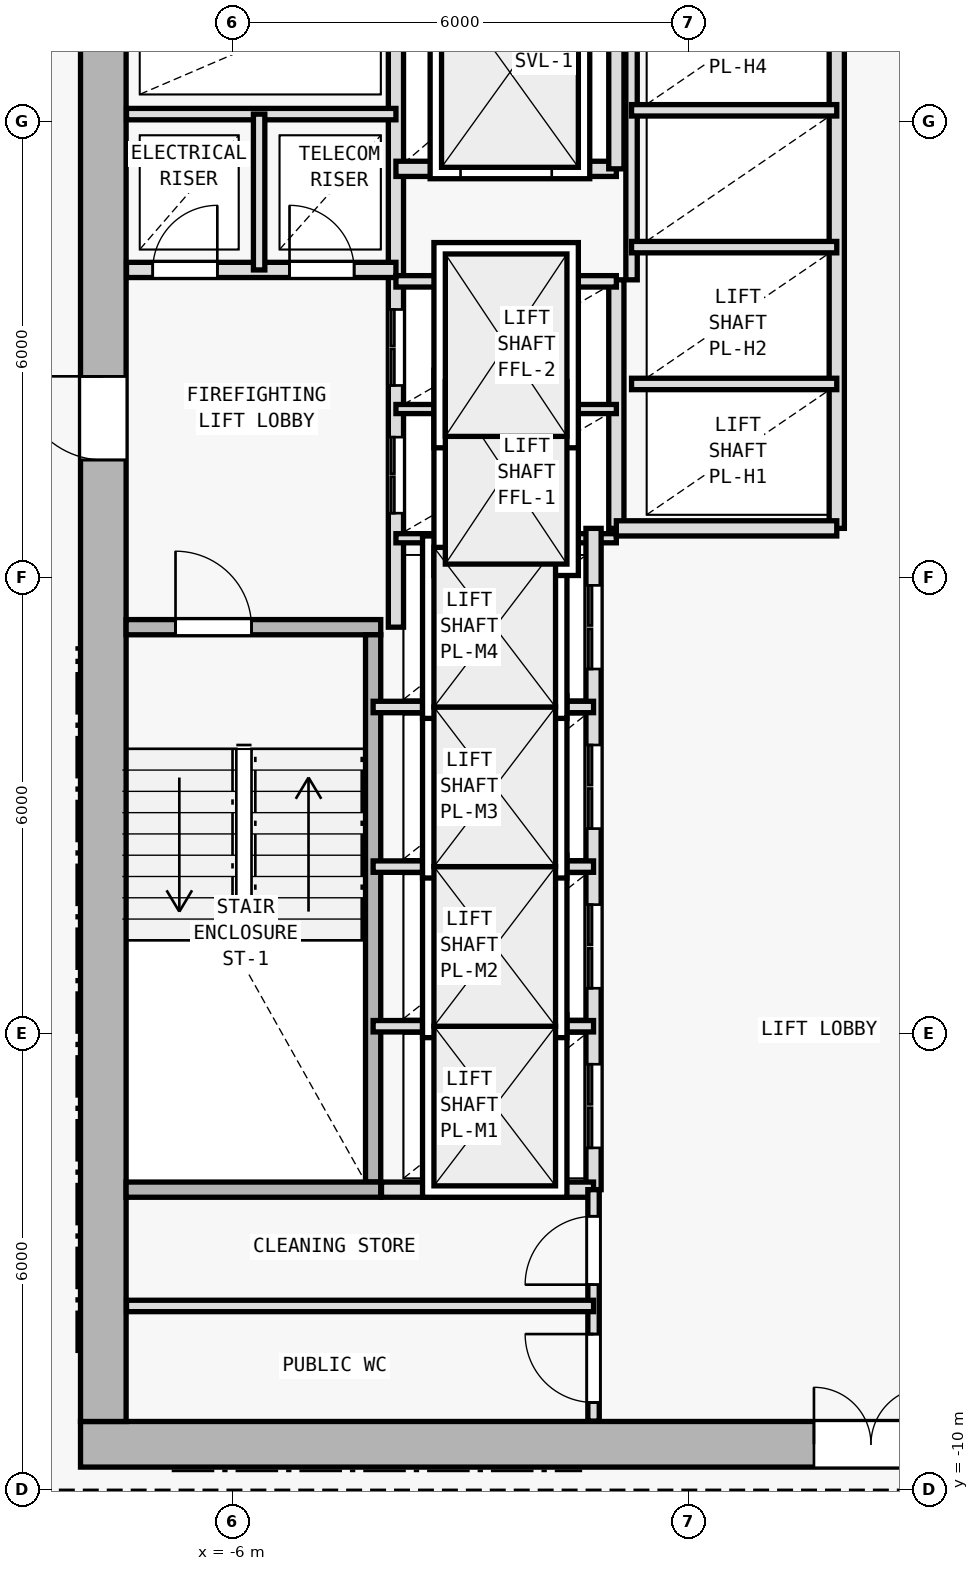
"""IFC4 building model, lengths in metres.
Left out: names, types, materials, properties, quantities, classifications, styles, units other than length and angle.
Written with IfcOpenShell. Run it as: python <this file> out.ifc"""

import sys

from ifc_helpers import new_model, si_unit, direction, frame, frame_2d, origin, origin_2d, place, context, subcontext, project, spatial, rectangle, i_section, extrude, element, fill, save


model = new_model("IFC4")
c1 = context("Model", 3, precision=1e-05, world=origin(), true_north=direction((0.0, 1.0)))
c2 = subcontext(c1, "Body", "Model", "MODEL_VIEW")
j1 = project(units=[si_unit("LENGTHUNIT", "METRE"), si_unit("PLANEANGLEUNIT", "RADIAN")], contexts=[c1])
p1 = place(None, origin())
s1 = spatial("IfcSite", under=j1, at=p1, CompositionType="ELEMENT")
p2 = place(p1, origin())
s2 = spatial("IfcBuilding", under=s1, at=p2, CompositionType="ELEMENT")
p3 = place(p2, frame((0.0, 0.0, 114.9)))
s3 = spatial("IfcBuildingStorey", under=s2, at=p3, CompositionType="ELEMENT", Elevation=114.9)
for number, where, z_axis, x_axis in (
    (1, (-7.7, -9.4, 0.0), (0.0, 0.0, 1.0), (1.0, 0.0, 0.0)),
    (2, (0.0, -9.4, 0.0), (0.0, 0.0, 1.0), (1.0, 0.0, 0.0)),
    (3, (-7.7, 2.0, 0.0), (0.0, 0.0, 1.0), (1.0, 0.0, 0.0)),
):
    element("IfcColumn", number, at=place(p3, frame(where, z_axis=z_axis, x_axis=x_axis)), inside=s3, PredefinedType="COLUMN", context=c2, shape_type="SweptSolid", body=[
        extrude(i_section(OverallWidth=0.409, OverallDepth=0.425, WebThickness=0.021, FlangeThickness=0.034, FilletRadius=0.015, at=origin_2d()), origin(), (0.0, 0.0, 1.0), 3.6),
    ])
p4 = place(p3, frame((-8.0, -9.4, 0.0), z_axis=(0.0, 0.0, 1.0), x_axis=(1.0, 0.0, 0.0)))
e4 = element("IfcWall", 4, at=p4, inside=s3, PredefinedType="SHEAR", context=c2, shape_type="SweptSolid", body=[
    extrude(rectangle(XDim=16.0, YDim=0.6, at=frame_2d((8.0, 0.0))), origin(), (0.0, 0.0, 1.0), 3.35),
])
p5 = place(p4, frame((9.65, 0.0, 0.0)))
e5 = element("IfcOpeningElement", 5, at=p5, cuts=e4, PredefinedType="OPENING", context=c2, shape_type="SweptSolid", body=[
    extrude(rectangle(XDim=1.5, YDim=2.2, at=frame_2d((0.75, 1.1))), frame((0.0, 0.31, 0.0), z_axis=(0.0, -1.0, 0.0), x_axis=(1.0, 0.0, 0.0)), (0.0, 0.0, 1.0), 0.62),
])
p6 = place(p3, frame((-7.7, -9.1, 0.0), z_axis=(0.0, 0.0, 1.0), x_axis=(0.0, 1.0, 0.0)))
e6 = element("IfcWall", 6, at=p6, inside=s3, PredefinedType="SHEAR", context=c2, shape_type="SweptSolid", body=[
    extrude(rectangle(XDim=19.0, YDim=0.6, at=frame_2d((9.5, 0.0))), origin(), (0.0, 0.0, 1.0), 3.35),
])
p7 = place(p6, frame((12.65, 0.0, 0.0)))
e7 = element("IfcOpeningElement", 7, at=p7, cuts=e6, PredefinedType="OPENING", context=c2, shape_type="SweptSolid", body=[
    extrude(rectangle(XDim=1.1, YDim=2.15, at=frame_2d((0.55, 1.075))), frame((0.0, 0.31, 0.0), z_axis=(0.0, -1.0, 0.0), x_axis=(1.0, 0.0, 0.0)), (0.0, 0.0, 1.0), 0.62),
])
p8 = place(p3, frame((-7.4, 1.35, 0.0), z_axis=(0.0, 0.0, 1.0), x_axis=(1.0, 0.0, 0.0)))
e8 = element("IfcWall", 8, at=p8, inside=s3, PredefinedType="SOLIDWALL", context=c2, shape_type="SweptSolid", body=[
    extrude(rectangle(XDim=3.35, YDim=0.2, at=frame_2d((1.675, 0.0))), origin(), (0.0, 0.0, 1.0), 3.35),
])
p9 = place(p8, frame((0.65, 0.0, 0.0)))
e9 = element("IfcOpeningElement", 9, at=p9, cuts=e8, PredefinedType="OPENING", context=c2, shape_type="SweptSolid", body=[
    extrude(rectangle(XDim=1.0, YDim=2.15, at=frame_2d((0.5, 1.075))), frame((0.0, 0.11, 0.0), z_axis=(0.0, -1.0, 0.0), x_axis=(1.0, 0.0, 0.0)), (0.0, 0.0, 1.0), 0.22),
])
p10 = place(p3, frame((-4.15, -5.95, 0.0), z_axis=(0.0, 0.0, 1.0), x_axis=(0.0, 1.0, 0.0)))
e10 = element("IfcWall", 10, at=p10, inside=s3, PredefinedType="SOLIDWALL", context=c2, shape_type="SweptSolid", body=[
    extrude(rectangle(XDim=7.2, YDim=0.2, at=frame_2d((3.6, 0.0))), origin(), (0.0, 0.0, 1.0), 3.35),
])
p11 = place(p3, frame((-3.85, 1.35, 0.0), z_axis=(0.0, 0.0, 1.0), x_axis=(0.0, 1.0, 0.0)))
e11 = element("IfcWall", 11, at=p11, inside=s3, PredefinedType="SOLIDWALL", context=c2, shape_type="SweptSolid", body=[
    extrude(rectangle(XDim=8.545, YDim=0.2, at=frame_2d((4.272, 0.0))), origin(), (0.0, 0.0, 1.0), 3.35),
])
p12 = place(p11, frame((1.5, 0.0, 0.0)))
e12 = element("IfcOpeningElement", 12, at=p12, cuts=e11, PredefinedType="OPENING", context=c2, shape_type="SweptSolid", body=[
    extrude(rectangle(XDim=1.0, YDim=2.15, at=frame_2d((0.5, 1.075))), frame((0.0, 0.11, 0.0), z_axis=(0.0, -1.0, 0.0), x_axis=(1.0, 0.0, 0.0)), (0.0, 0.0, 1.0), 0.22),
])
p13 = place(p11, frame((3.18, 0.0, 0.0)))
e13 = element("IfcOpeningElement", 13, at=p13, cuts=e11, PredefinedType="OPENING", context=c2, shape_type="SweptSolid", body=[
    extrude(rectangle(XDim=1.0, YDim=2.15, at=frame_2d((0.5, 1.075))), frame((0.0, 0.11, 0.0), z_axis=(0.0, -1.0, 0.0), x_axis=(1.0, 0.0, 0.0)), (0.0, 0.0, 1.0), 0.22),
])
p14 = place(p3, frame((-7.395, 6.05, 0.0), z_axis=(0.0, 0.0, 1.0), x_axis=(1.0, 0.0, 0.0)))
e14 = element("IfcWall", 14, at=p14, inside=s3, PredefinedType="SOLIDWALL", context=c2, shape_type="SweptSolid", body=[
    extrude(rectangle(XDim=3.545, YDim=0.2, at=frame_2d((1.772, 0.0))), origin(), (0.0, 0.0, 1.0), 3.35),
])
p15 = place(p14, frame((0.345, 0.0, 0.0)))
e15 = element("IfcOpeningElement", 15, at=p15, cuts=e14, PredefinedType="OPENING", context=c2, shape_type="SweptSolid", body=[
    extrude(rectangle(XDim=0.85, YDim=2.1, at=frame_2d((0.425, 1.05))), frame((0.0, 0.11, 0.0), z_axis=(0.0, -1.0, 0.0), x_axis=(1.0, 0.0, 0.0)), (0.0, 0.0, 1.0), 0.22),
])
p16 = place(p14, frame((2.145, 0.0, 0.0)))
e16 = element("IfcOpeningElement", 16, at=p16, cuts=e14, PredefinedType="OPENING", context=c2, shape_type="SweptSolid", body=[
    extrude(rectangle(XDim=0.85, YDim=2.1, at=frame_2d((0.425, 1.05))), frame((0.0, 0.11, 0.0), z_axis=(0.0, -1.0, 0.0), x_axis=(1.0, 0.0, 0.0)), (0.0, 0.0, 1.0), 0.22),
])
p17 = place(p3, frame((-7.395, 8.1, 0.0), z_axis=(0.0, 0.0, 1.0), x_axis=(1.0, 0.0, 0.0)))
e17 = element("IfcWall", 17, at=p17, inside=s3, PredefinedType="PARTITIONING", context=c2, shape_type="SweptSolid", body=[
    extrude(rectangle(XDim=3.545, YDim=0.15, at=frame_2d((1.772, 0.0))), origin(), (0.0, 0.0, 1.0), 3.35),
])
p18 = place(p3, frame((-5.65, 6.05, 0.0), z_axis=(0.0, 0.0, 1.0), x_axis=(0.0, 1.0, 0.0)))
e18 = element("IfcWall", 18, at=p18, inside=s3, PredefinedType="PARTITIONING", context=c2, shape_type="SweptSolid", body=[
    extrude(rectangle(XDim=2.05, YDim=0.15, at=frame_2d((1.025, 0.0))), origin(), (0.0, 0.0, 1.0), 3.35),
])
p19 = place(p3, frame((-0.95, 2.65, 0.0), z_axis=(0.0, 0.0, 1.0), x_axis=(0.0, 1.0, 0.0)))
e19 = element("IfcWall", 19, at=p19, inside=s3, PredefinedType="SOLIDWALL", context=c2, shape_type="SweptSolid", body=[
    extrude(rectangle(XDim=3.27, YDim=0.2, at=frame_2d((1.635, 0.0))), origin(), (0.0, 0.0, 1.0), 3.35),
])
for number, where, z_axis, x_axis in (
    (20, (-3.85, 2.52, 0.0), (0.0, 0.0, 1.0), (1.0, 0.0, 0.0)),
    (21, (-3.85, 4.22, 0.0), (0.0, 0.0, 1.0), (1.0, 0.0, 0.0)),
):
    element("IfcWall", number, at=place(p3, frame(where, z_axis=z_axis, x_axis=x_axis)), inside=s3, PredefinedType="PARTITIONING", context=c2, shape_type="SweptSolid", body=[
        extrude(rectangle(XDim=2.9, YDim=0.12, at=frame_2d((1.45, 0.0))), origin(), (0.0, 0.0, 1.0), 3.35),
    ])
p20 = place(p3, frame((-3.85, 5.9, 0.0), z_axis=(0.0, 0.0, 1.0), x_axis=(1.0, 0.0, 0.0)))
e22 = element("IfcWall", 22, at=p20, inside=s3, PredefinedType="PARTITIONING", context=c2, shape_type="SweptSolid", body=[
    extrude(rectangle(XDim=2.9, YDim=0.15, at=frame_2d((1.45, 0.0))), origin(), (0.0, 0.0, 1.0), 3.35),
])
p21 = place(p3, frame((-3.85, 7.38, 0.0), z_axis=(0.0, 0.0, 1.0), x_axis=(1.0, 0.0, 0.0)))
e23 = element("IfcWall", 23, at=p21, inside=s3, PredefinedType="SOLIDWALL", context=c2, shape_type="SweptSolid", body=[
    extrude(rectangle(XDim=2.9, YDim=0.2, at=frame_2d((1.45, 0.0))), origin(), (0.0, 0.0, 1.0), 3.35),
])
p22 = place(p21, frame((0.85, 0.0, 0.0)))
e24 = element("IfcOpeningElement", 24, at=p22, cuts=e23, PredefinedType="OPENING", context=c2, shape_type="SweptSolid", body=[
    extrude(rectangle(XDim=1.2, YDim=2.2, at=frame_2d((0.6, 1.1))), frame((0.0, 0.11, 0.0), z_axis=(0.0, -1.0, 0.0), x_axis=(1.0, 0.0, 0.0)), (0.0, 0.0, 1.0), 0.22),
])
p23 = place(p3, frame((-0.95, 7.38, 0.0), z_axis=(0.0, 0.0, 1.0), x_axis=(0.0, 1.0, 0.0)))
e25 = element("IfcWall", 25, at=p23, inside=s3, PredefinedType="SOLIDWALL", context=c2, shape_type="SweptSolid", body=[
    extrude(rectangle(XDim=2.515, YDim=0.2, at=frame_2d((1.258, 0.0))), origin(), (0.0, 0.0, 1.0), 3.35),
])
p24 = place(p3, frame((-1.25, -6.05, 0.0), z_axis=(0.0, 0.0, 1.0), x_axis=(0.0, 1.0, 0.0)))
e26 = element("IfcWall", 26, at=p24, inside=s3, PredefinedType="SOLIDWALL", context=c2, shape_type="SweptSolid", body=[
    extrude(rectangle(XDim=8.7, YDim=0.2, at=frame_2d((4.35, 0.0))), origin(), (0.0, 0.0, 1.0), 3.35),
])
p25 = place(p24, frame((0.55, 0.0, 0.0)))
e27 = element("IfcOpeningElement", 27, at=p25, cuts=e26, PredefinedType="OPENING", context=c2, shape_type="SweptSolid", body=[
    extrude(rectangle(XDim=1.1, YDim=2.15, at=frame_2d((0.55, 1.075))), frame((0.0, 0.11, 0.0), z_axis=(0.0, -1.0, 0.0), x_axis=(1.0, 0.0, 0.0)), (0.0, 0.0, 1.0), 0.22),
])
p26 = place(p24, frame((2.65, 0.0, 0.0)))
e28 = element("IfcOpeningElement", 28, at=p26, cuts=e26, PredefinedType="OPENING", context=c2, shape_type="SweptSolid", body=[
    extrude(rectangle(XDim=1.1, YDim=2.15, at=frame_2d((0.55, 1.075))), frame((0.0, 0.11, 0.0), z_axis=(0.0, -1.0, 0.0), x_axis=(1.0, 0.0, 0.0)), (0.0, 0.0, 1.0), 0.22),
])
p27 = place(p24, frame((4.75, 0.0, 0.0)))
e29 = element("IfcOpeningElement", 29, at=p27, cuts=e26, PredefinedType="OPENING", context=c2, shape_type="SweptSolid", body=[
    extrude(rectangle(XDim=1.1, YDim=2.15, at=frame_2d((0.55, 1.075))), frame((0.0, 0.11, 0.0), z_axis=(0.0, -1.0, 0.0), x_axis=(1.0, 0.0, 0.0)), (0.0, 0.0, 1.0), 0.22),
])
p28 = place(p24, frame((6.85, 0.0, 0.0)))
e30 = element("IfcOpeningElement", 30, at=p28, cuts=e26, PredefinedType="OPENING", context=c2, shape_type="SweptSolid", body=[
    extrude(rectangle(XDim=1.1, YDim=2.15, at=frame_2d((0.55, 1.075))), frame((0.0, 0.11, 0.0), z_axis=(0.0, -1.0, 0.0), x_axis=(1.0, 0.0, 0.0)), (0.0, 0.0, 1.0), 0.22),
])
for number, where, z_axis, x_axis in (
    (31, (-4.15, -3.9, 0.0), (0.0, 0.0, 1.0), (1.0, 0.0, 0.0)),
    (32, (-4.15, -1.8, 0.0), (0.0, 0.0, 1.0), (1.0, 0.0, 0.0)),
    (33, (-4.15, 0.3, 0.0), (0.0, 0.0, 1.0), (1.0, 0.0, 0.0)),
):
    element("IfcWall", number, at=place(p3, frame(where, z_axis=z_axis, x_axis=x_axis)), inside=s3, PredefinedType="PARTITIONING", context=c2, shape_type="SweptSolid", body=[
        extrude(rectangle(XDim=2.9, YDim=0.15, at=frame_2d((1.45, 0.0))), origin(), (0.0, 0.0, 1.0), 3.35),
    ])
p29 = place(p3, frame((1.95, 2.65, 0.0), z_axis=(0.0, 0.0, 1.0), x_axis=(0.0, 1.0, 0.0)))
e34 = element("IfcWall", 34, at=p29, inside=s3, PredefinedType="SOLIDWALL", context=c2, shape_type="SweptSolid", body=[
    extrude(rectangle(XDim=7.245, YDim=0.2, at=frame_2d((3.623, 0.0))), origin(), (0.0, 0.0, 1.0), 3.35),
])
p30 = place(p3, frame((-0.95, 2.65, 0.0), z_axis=(0.0, 0.0, 1.0), x_axis=(1.0, 0.0, 0.0)))
e35 = element("IfcWall", 35, at=p30, inside=s3, PredefinedType="SOLIDWALL", context=c2, shape_type="SweptSolid", body=[
    extrude(rectangle(XDim=2.9, YDim=0.2, at=frame_2d((1.45, 0.0))), origin(), (0.0, 0.0, 1.0), 3.35),
])
p31 = place(p3, frame((-0.75, 5.92, 0.0), z_axis=(0.0, 0.0, 1.0), x_axis=(0.0, 1.0, 0.0)))
e36 = element("IfcWall", 36, at=p31, inside=s3, PredefinedType="PARTITIONING", context=c2, shape_type="SweptSolid", body=[
    extrude(rectangle(XDim=3.975, YDim=0.15, at=frame_2d((1.988, 0.0))), origin(), (0.0, 0.0, 1.0), 3.35),
])
for number, where, z_axis, x_axis in (
    (37, (-0.75, 4.55, 0.0), (0.0, 0.0, 1.0), (1.0, 0.0, 0.0)),
    (38, (-0.75, 6.35, 0.0), (0.0, 0.0, 1.0), (1.0, 0.0, 0.0)),
    (39, (-0.75, 8.15, 0.0), (0.0, 0.0, 1.0), (1.0, 0.0, 0.0)),
):
    element("IfcWall", number, at=place(p3, frame(where, z_axis=z_axis, x_axis=x_axis)), inside=s3, PredefinedType="PARTITIONING", context=c2, shape_type="SweptSolid", body=[
        extrude(rectangle(XDim=2.7, YDim=0.15, at=frame_2d((1.35, 0.0))), origin(), (0.0, 0.0, 1.0), 3.35),
    ])
p32 = place(p3, frame((-7.4, -6.05, 0.0), z_axis=(0.0, 0.0, 1.0), x_axis=(1.0, 0.0, 0.0)))
e40 = element("IfcWall", 40, at=p32, inside=s3, PredefinedType="SOLIDWALL", context=c2, shape_type="SweptSolid", body=[
    extrude(rectangle(XDim=3.35, YDim=0.2, at=frame_2d((1.675, 0.0))), origin(), (0.0, 0.0, 1.0), 3.35),
])
p33 = place(p3, frame((-4.04, -6.05, 0.0), z_axis=(0.0, 0.0, 1.0), x_axis=(1.0, 0.0, 0.0)))
e41 = element("IfcWall", 41, at=p33, inside=s3, PredefinedType="SOLIDWALL", context=c2, shape_type="SweptSolid", body=[
    extrude(rectangle(XDim=2.79, YDim=0.2, at=frame_2d((1.395, 0.0))), origin(), (0.0, 0.0, 1.0), 3.35),
])
p34 = place(p3, frame((-1.25, -9.095, 0.0), z_axis=(0.0, 0.0, 1.0), x_axis=(0.0, 1.0, 0.0)))
e42 = element("IfcWall", 42, at=p34, inside=s3, PredefinedType="PARTITIONING", context=c2, shape_type="SweptSolid", body=[
    extrude(rectangle(XDim=3.045, YDim=0.15, at=frame_2d((1.522, 0.0))), origin(), (0.0, 0.0, 1.0), 3.35),
])
p35 = place(p34, frame((1.795, 0.0, 0.0)))
e43 = element("IfcOpeningElement", 43, at=p35, cuts=e42, PredefinedType="OPENING", context=c2, shape_type="SweptSolid", body=[
    extrude(rectangle(XDim=0.9, YDim=2.1, at=frame_2d((0.45, 1.05))), frame((0.0, 0.085, 0.0), z_axis=(0.0, -1.0, 0.0), x_axis=(1.0, 0.0, 0.0)), (0.0, 0.0, 1.0), 0.17),
])
p36 = place(p34, frame((0.245, 0.0, 0.0)))
e44 = element("IfcOpeningElement", 44, at=p36, cuts=e42, PredefinedType="OPENING", context=c2, shape_type="SweptSolid", body=[
    extrude(rectangle(XDim=0.9, YDim=2.1, at=frame_2d((0.45, 1.05))), frame((0.0, 0.085, 0.0), z_axis=(0.0, -1.0, 0.0), x_axis=(1.0, 0.0, 0.0)), (0.0, 0.0, 1.0), 0.17),
])
p37 = place(p3, frame((-7.395, -7.58, 0.0), z_axis=(0.0, 0.0, 1.0), x_axis=(1.0, 0.0, 0.0)))
e45 = element("IfcWall", 45, at=p37, inside=s3, PredefinedType="PARTITIONING", context=c2, shape_type="SweptSolid", body=[
    extrude(rectangle(XDim=6.145, YDim=0.15, at=frame_2d((3.073, 0.0))), origin(), (0.0, 0.0, 1.0), 3.35),
])
p38 = place(p3, frame((-9.86, 8.426, 0.0), z_axis=(0.0, 0.0, 1.0), x_axis=(0.582449511476, 0.812866881218, 0.0)))
e46 = element("IfcWall", 46, at=p38, inside=s3, PredefinedType="PARTITIONING", context=c2, shape_type="SweptSolid", body=[
    extrude(rectangle(XDim=4.84, YDim=0.15, at=frame_2d((2.42, 0.0))), origin(), (0.0, 0.0, 1.0), 2.875),
])
p39 = place(p5, origin())
e47 = element("IfcDoor", 47, at=p39, inside=s3, OperationType="DOUBLE_DOOR_SINGLE_SWING", PredefinedType="DOOR", context=c2, shape_type="SweptSolid", body=[
    extrude(rectangle(XDim=1.5, YDim=2.2, at=frame_2d((0.75, 1.1))), frame((0.0, 0.025, 0.0), z_axis=(0.0, -1.0, 0.0), x_axis=(1.0, 0.0, 0.0)), (0.0, 0.0, 1.0), 0.05),
])
fill(e5, e47)
p40 = place(p7, origin())
e48 = element("IfcDoor", 48, at=p40, inside=s3, OperationType="SINGLE_SWING_RIGHT", PredefinedType="DOOR", context=c2, shape_type="SweptSolid", body=[
    extrude(rectangle(XDim=1.1, YDim=2.15, at=frame_2d((0.55, 1.075))), frame((0.0, 0.025, 0.0), z_axis=(0.0, -1.0, 0.0), x_axis=(1.0, 0.0, 0.0)), (0.0, 0.0, 1.0), 0.05),
])
fill(e7, e48)
p41 = place(p9, origin())
e49 = element("IfcDoor", 49, at=p41, inside=s3, OperationType="SINGLE_SWING_LEFT", PredefinedType="DOOR", context=c2, shape_type="SweptSolid", body=[
    extrude(rectangle(XDim=1.0, YDim=2.15, at=frame_2d((0.5, 1.075))), frame((0.0, 0.025, 0.0), z_axis=(0.0, -1.0, 0.0), x_axis=(1.0, 0.0, 0.0)), (0.0, 0.0, 1.0), 0.05),
])
fill(e9, e49)
p42 = place(p15, origin())
e50 = element("IfcDoor", 50, at=p42, inside=s3, OperationType="SINGLE_SWING_RIGHT", PredefinedType="DOOR", context=c2, shape_type="SweptSolid", body=[
    extrude(rectangle(XDim=0.85, YDim=2.1, at=frame_2d((0.425, 1.05))), frame((0.0, 0.025, 0.0), z_axis=(0.0, -1.0, 0.0), x_axis=(1.0, 0.0, 0.0)), (0.0, 0.0, 1.0), 0.05),
])
fill(e15, e50)
p43 = place(p16, origin())
e51 = element("IfcDoor", 51, at=p43, inside=s3, OperationType="SINGLE_SWING_LEFT", PredefinedType="DOOR", context=c2, shape_type="SweptSolid", body=[
    extrude(rectangle(XDim=0.85, YDim=2.1, at=frame_2d((0.425, 1.05))), frame((0.0, 0.025, 0.0), z_axis=(0.0, -1.0, 0.0), x_axis=(1.0, 0.0, 0.0)), (0.0, 0.0, 1.0), 0.05),
])
fill(e16, e51)
p44 = place(p22, origin())
e52 = element("IfcDoor", 52, at=p44, inside=s3, OperationType="DOUBLE_DOOR_SLIDING", PredefinedType="DOOR", context=c2, shape_type="SweptSolid", body=[
    extrude(rectangle(XDim=1.2, YDim=2.2, at=frame_2d((0.6, 1.1))), frame((0.0, 0.025, 0.0), z_axis=(0.0, -1.0, 0.0), x_axis=(1.0, 0.0, 0.0)), (0.0, 0.0, 1.0), 0.05),
])
fill(e24, e52)
p45 = place(p25, origin())
e53 = element("IfcDoor", 53, at=p45, inside=s3, OperationType="DOUBLE_DOOR_SLIDING", PredefinedType="DOOR", context=c2, shape_type="SweptSolid", body=[
    extrude(rectangle(XDim=1.1, YDim=2.15, at=frame_2d((0.55, 1.075))), frame((0.0, 0.025, 0.0), z_axis=(0.0, -1.0, 0.0), x_axis=(1.0, 0.0, 0.0)), (0.0, 0.0, 1.0), 0.05),
])
fill(e27, e53)
p46 = place(p26, origin())
e54 = element("IfcDoor", 54, at=p46, inside=s3, OperationType="DOUBLE_DOOR_SLIDING", PredefinedType="DOOR", context=c2, shape_type="SweptSolid", body=[
    extrude(rectangle(XDim=1.1, YDim=2.15, at=frame_2d((0.55, 1.075))), frame((0.0, 0.025, 0.0), z_axis=(0.0, -1.0, 0.0), x_axis=(1.0, 0.0, 0.0)), (0.0, 0.0, 1.0), 0.05),
])
fill(e28, e54)
p47 = place(p27, origin())
e55 = element("IfcDoor", 55, at=p47, inside=s3, OperationType="DOUBLE_DOOR_SLIDING", PredefinedType="DOOR", context=c2, shape_type="SweptSolid", body=[
    extrude(rectangle(XDim=1.1, YDim=2.15, at=frame_2d((0.55, 1.075))), frame((0.0, 0.025, 0.0), z_axis=(0.0, -1.0, 0.0), x_axis=(1.0, 0.0, 0.0)), (0.0, 0.0, 1.0), 0.05),
])
fill(e29, e55)
p48 = place(p28, origin())
e56 = element("IfcDoor", 56, at=p48, inside=s3, OperationType="DOUBLE_DOOR_SLIDING", PredefinedType="DOOR", context=c2, shape_type="SweptSolid", body=[
    extrude(rectangle(XDim=1.1, YDim=2.15, at=frame_2d((0.55, 1.075))), frame((0.0, 0.025, 0.0), z_axis=(0.0, -1.0, 0.0), x_axis=(1.0, 0.0, 0.0)), (0.0, 0.0, 1.0), 0.05),
])
fill(e30, e56)
p49 = place(p12, origin())
e57 = element("IfcDoor", 57, at=p49, inside=s3, OperationType="DOUBLE_DOOR_SLIDING", PredefinedType="DOOR", context=c2, shape_type="SweptSolid", body=[
    extrude(rectangle(XDim=1.0, YDim=2.15, at=frame_2d((0.5, 1.075))), frame((0.0, 0.025, 0.0), z_axis=(0.0, -1.0, 0.0), x_axis=(1.0, 0.0, 0.0)), (0.0, 0.0, 1.0), 0.05),
])
fill(e12, e57)
p50 = place(p13, origin())
e58 = element("IfcDoor", 58, at=p50, inside=s3, OperationType="DOUBLE_DOOR_SLIDING", PredefinedType="DOOR", context=c2, shape_type="SweptSolid", body=[
    extrude(rectangle(XDim=1.0, YDim=2.15, at=frame_2d((0.5, 1.075))), frame((0.0, 0.025, 0.0), z_axis=(0.0, -1.0, 0.0), x_axis=(1.0, 0.0, 0.0)), (0.0, 0.0, 1.0), 0.05),
])
fill(e13, e58)
p51 = place(p35, origin())
e59 = element("IfcDoor", 59, at=p51, inside=s3, OperationType="SINGLE_SWING_LEFT", PredefinedType="DOOR", context=c2, shape_type="SweptSolid", body=[
    extrude(rectangle(XDim=0.9, YDim=2.1, at=frame_2d((0.45, 1.05))), frame((0.0, 0.025, 0.0), z_axis=(0.0, -1.0, 0.0), x_axis=(1.0, 0.0, 0.0)), (0.0, 0.0, 1.0), 0.05),
])
fill(e43, e59)
p52 = place(p36, origin())
e60 = element("IfcDoor", 60, at=p52, inside=s3, OperationType="SINGLE_SWING_RIGHT", PredefinedType="DOOR", context=c2, shape_type="SweptSolid", body=[
    extrude(rectangle(XDim=0.9, YDim=2.1, at=frame_2d((0.45, 1.05))), frame((0.0, 0.025, 0.0), z_axis=(0.0, -1.0, 0.0), x_axis=(1.0, 0.0, 0.0)), (0.0, 0.0, 1.0), 0.05),
])
fill(e44, e60)
save(model, sys.argv[1])
